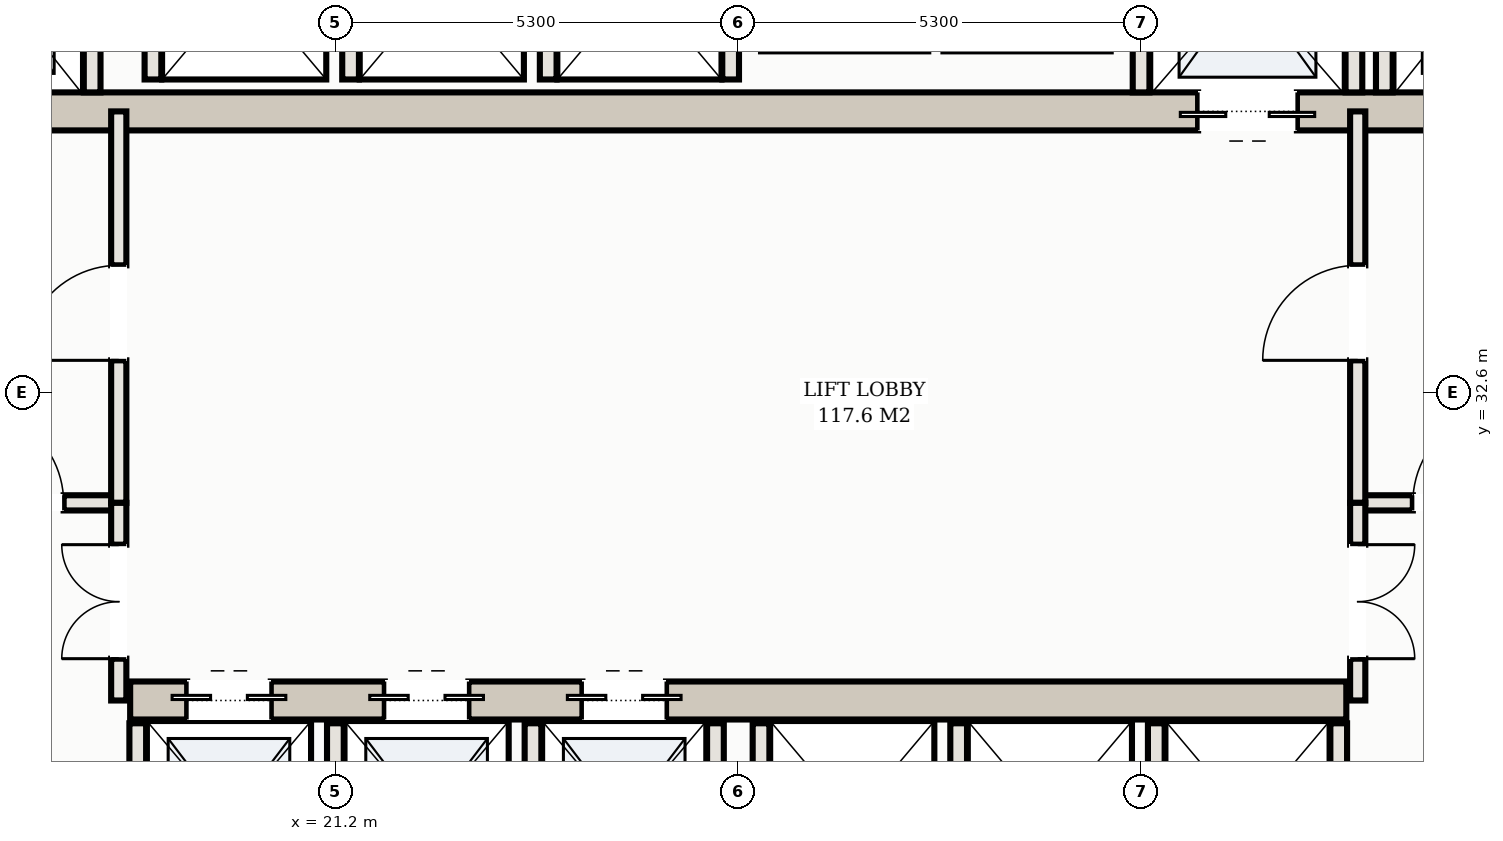
"""IFC4 building model, lengths in metres.
Left out: names, types, materials, properties, quantities, classifications, styles, units other than length and angle.
Written with IfcOpenShell. Run it as: python <this file> out.ifc"""

import sys

from ifc_helpers import new_model, si_unit, direction, frame, frame_2d, origin, place, context, subcontext, project, spatial, rectangle, extrude, element, fill, save


model = new_model("IFC4")
c1 = context("Model", 3, precision=1e-05, world=origin(), true_north=direction((0.0, 1.0)))
c2 = subcontext(c1, "Body", "Model", "MODEL_VIEW")
j1 = project(units=[si_unit("LENGTHUNIT", "METRE"), si_unit("PLANEANGLEUNIT", "RADIAN")], contexts=[c1])
p1 = place(None, origin())
s1 = spatial("IfcSite", under=j1, at=p1, CompositionType="ELEMENT")
p2 = place(p1, origin())
s2 = spatial("IfcBuilding", under=s1, at=p2, CompositionType="ELEMENT")
p3 = place(p2, frame((0.0, 0.0, 24.2)))
s3 = spatial("IfcBuildingStorey", under=s2, at=p3, CompositionType="ELEMENT", Elevation=24.2)
p4 = place(p3, frame((15.5, 36.3, 0.0), z_axis=(0.0, 0.0, 1.0), x_axis=(1.0, 0.0, 0.0)))
e1 = element("IfcWall", 1, at=p4, inside=s3, PredefinedType="SHEAR", context=c2, shape_type="SweptSolid", body=[
    extrude(rectangle(XDim=22.0, YDim=0.5, at=frame_2d((11.0, 0.0))), origin(), (0.0, 0.0, 1.0), 3.08),
])
p5 = place(p4, frame((0.65, 0.0, 0.0)))
e2 = element("IfcOpeningElement", 2, at=p5, cuts=e1, PredefinedType="OPENING", context=c2, shape_type="SweptSolid", body=[
    extrude(rectangle(XDim=1.1, YDim=2.15, at=frame_2d((0.55, 1.075))), frame((0.0, 0.26, 0.0), z_axis=(0.0, -1.0, 0.0), x_axis=(1.0, 0.0, 0.0)), (0.0, 0.0, 1.0), 0.52),
])
p6 = place(p4, frame((20.25, 0.0, 0.0)))
e3 = element("IfcOpeningElement", 3, at=p6, cuts=e1, PredefinedType="OPENING", context=c2, shape_type="SweptSolid", body=[
    extrude(rectangle(XDim=1.1, YDim=2.15, at=frame_2d((0.55, 1.075))), frame((0.0, 0.26, 0.0), z_axis=(0.0, -1.0, 0.0), x_axis=(1.0, 0.0, 0.0)), (0.0, 0.0, 1.0), 0.52),
])
p7 = place(p4, frame((17.05, 0.0, 0.0)))
e4 = element("IfcOpeningElement", 4, at=p7, cuts=e1, PredefinedType="OPENING", context=c2, shape_type="SweptSolid", body=[
    extrude(rectangle(XDim=1.3, YDim=2.2, at=frame_2d((0.65, 1.1))), frame((0.0, 0.26, 0.0), z_axis=(0.0, -1.0, 0.0), x_axis=(1.0, 0.0, 0.0)), (0.0, 0.0, 1.0), 0.52),
])
p8 = place(p3, frame((18.5, 28.55, 0.0), z_axis=(0.0, 0.0, 1.0), x_axis=(1.0, 0.0, 0.0)))
e5 = element("IfcWall", 5, at=p8, inside=s3, PredefinedType="SHEAR", context=c2, shape_type="SweptSolid", body=[
    extrude(rectangle(XDim=16.0, YDim=0.5, at=frame_2d((8.0, 0.0))), origin(), (0.0, 0.0, 1.0), 3.08),
])
p9 = place(p8, frame((0.75, 0.0, 0.0)))
e6 = element("IfcOpeningElement", 6, at=p9, cuts=e5, PredefinedType="OPENING", context=c2, shape_type="SweptSolid", body=[
    extrude(rectangle(XDim=1.1, YDim=2.15, at=frame_2d((0.55, 1.075))), frame((0.0, 0.26, 0.0), z_axis=(0.0, -1.0, 0.0), x_axis=(1.0, 0.0, 0.0)), (0.0, 0.0, 1.0), 0.52),
])
p10 = place(p8, frame((3.35, 0.0, 0.0)))
e7 = element("IfcOpeningElement", 7, at=p10, cuts=e5, PredefinedType="OPENING", context=c2, shape_type="SweptSolid", body=[
    extrude(rectangle(XDim=1.1, YDim=2.15, at=frame_2d((0.55, 1.075))), frame((0.0, 0.26, 0.0), z_axis=(0.0, -1.0, 0.0), x_axis=(1.0, 0.0, 0.0)), (0.0, 0.0, 1.0), 0.52),
])
p11 = place(p8, frame((5.95, 0.0, 0.0)))
e8 = element("IfcOpeningElement", 8, at=p11, cuts=e5, PredefinedType="OPENING", context=c2, shape_type="SweptSolid", body=[
    extrude(rectangle(XDim=1.1, YDim=2.15, at=frame_2d((0.55, 1.075))), frame((0.0, 0.26, 0.0), z_axis=(0.0, -1.0, 0.0), x_axis=(1.0, 0.0, 0.0)), (0.0, 0.0, 1.0), 0.52),
])
for number, where, z_axis, x_axis in (
    (9, (18.0, 36.55, 0.0), (0.0, 0.0, 1.0), (0.0, 1.0, 0.0)),
    (10, (35.0, 36.55, 0.0), (0.0, 0.0, 1.0), (0.0, 1.0, 0.0)),
    (11, (31.8, 36.55, 0.0), (0.0, 0.0, 1.0), (0.0, 1.0, 0.0)),
    (12, (34.6, 36.55, 0.0), (0.0, 0.0, 1.0), (0.0, 1.0, 0.0)),
):
    element("IfcWall", number, at=place(p3, frame(where, z_axis=z_axis, x_axis=x_axis)), inside=s3, PredefinedType="SOLIDWALL", context=c2, shape_type="SweptSolid", body=[
        extrude(rectangle(XDim=2.93, YDim=0.22, at=frame_2d((1.465, 0.0))), origin(), (0.0, 0.0, 1.0), 3.08),
    ])
for number, where, z_axis, x_axis in (
    (13, (18.6, 25.72, 0.0), (0.0, 0.0, 1.0), (0.0, 1.0, 0.0)),
    (14, (21.2, 25.72, 0.0), (0.0, 0.0, 1.0), (0.0, 1.0, 0.0)),
    (15, (23.8, 25.72, 0.0), (0.0, 0.0, 1.0), (0.0, 1.0, 0.0)),
    (16, (26.2, 25.72, 0.0), (0.0, 0.0, 1.0), (0.0, 1.0, 0.0)),
    (17, (26.8, 25.72, 0.0), (0.0, 0.0, 1.0), (0.0, 1.0, 0.0)),
    (18, (29.4, 25.72, 0.0), (0.0, 0.0, 1.0), (0.0, 1.0, 0.0)),
    (19, (32.0, 25.72, 0.0), (0.0, 0.0, 1.0), (0.0, 1.0, 0.0)),
    (20, (34.4, 25.72, 0.0), (0.0, 0.0, 1.0), (0.0, 1.0, 0.0)),
):
    element("IfcWall", number, at=place(p3, frame(where, z_axis=z_axis, x_axis=x_axis)), inside=s3, PredefinedType="SOLIDWALL", context=c2, shape_type="SweptSolid", body=[
        extrude(rectangle(XDim=2.53, YDim=0.22, at=frame_2d((1.265, 0.0))), origin(), (0.0, 0.0, 1.0), 3.08),
    ])
for number, where, z_axis, x_axis in (
    (21, (18.8, 36.72, 0.0), (0.0, 0.0, 1.0), (0.0, 1.0, 0.0)),
    (22, (21.4, 36.72, 0.0), (0.0, 0.0, 1.0), (0.0, 1.0, 0.0)),
    (23, (24.0, 36.72, 0.0), (0.0, 0.0, 1.0), (0.0, 1.0, 0.0)),
    (24, (26.4, 36.72, 0.0), (0.0, 0.0, 1.0), (0.0, 1.0, 0.0)),
):
    element("IfcWall", number, at=place(p3, frame(where, z_axis=z_axis, x_axis=x_axis)), inside=s3, PredefinedType="SOLIDWALL", context=c2, shape_type="SweptSolid", body=[
        extrude(rectangle(XDim=2.56, YDim=0.22, at=frame_2d((1.28, 0.0))), origin(), (0.0, 0.0, 1.0), 3.08),
    ])
p12 = place(p3, frame((15.1, 31.15, 0.0), z_axis=(0.0, 0.0, 1.0), x_axis=(1.0, 0.0, 0.0)))
e25 = element("IfcWall", 25, at=p12, inside=s3, PredefinedType="PARTITIONING", context=c2, shape_type="SweptSolid", body=[
    extrude(rectangle(XDim=3.25, YDim=0.2, at=frame_2d((1.625, 0.0))), origin(), (0.0, 0.0, 1.0), 2.57),
])
p13 = place(p12, frame((1.275, 0.0, 0.0)))
e26 = element("IfcOpeningElement", 26, at=p13, cuts=e25, PredefinedType="OPENING", context=c2, shape_type="SweptSolid", body=[
    extrude(rectangle(XDim=1.25, YDim=2.2, at=frame_2d((0.625, 1.1))), frame((0.0, 0.11, 0.0), z_axis=(0.0, -1.0, 0.0), x_axis=(1.0, 0.0, 0.0)), (0.0, 0.0, 1.0), 0.22),
])
p14 = place(p3, frame((18.35, 31.15, 0.0), z_axis=(0.0, 0.0, 1.0), x_axis=(0.0, 1.0, 0.0)))
e27 = element("IfcWall", 27, at=p14, inside=s3, PredefinedType="PARTITIONING", context=c2, shape_type="SweptSolid", body=[
    extrude(rectangle(XDim=5.15, YDim=0.2, at=frame_2d((2.575, 0.0))), origin(), (0.0, 0.0, 1.0), 2.57),
])
p15 = place(p14, frame((1.875, 0.0, 0.0)))
e28 = element("IfcOpeningElement", 28, at=p15, cuts=e27, PredefinedType="OPENING", context=c2, shape_type="SweptSolid", body=[
    extrude(rectangle(XDim=1.25, YDim=2.2, at=frame_2d((0.625, 1.1))), frame((0.0, 0.11, 0.0), z_axis=(0.0, -1.0, 0.0), x_axis=(1.0, 0.0, 0.0)), (0.0, 0.0, 1.0), 0.22),
])
p16 = place(p3, frame((34.65, 31.15, 0.0), z_axis=(0.0, 0.0, 1.0), x_axis=(1.0, 0.0, 0.0)))
e29 = element("IfcWall", 29, at=p16, inside=s3, PredefinedType="PARTITIONING", context=c2, shape_type="SweptSolid", body=[
    extrude(rectangle(XDim=3.25, YDim=0.2, at=frame_2d((1.625, 0.0))), origin(), (0.0, 0.0, 1.0), 2.57),
])
p17 = place(p16, frame((0.725, 0.0, 0.0)))
e30 = element("IfcOpeningElement", 30, at=p17, cuts=e29, PredefinedType="OPENING", context=c2, shape_type="SweptSolid", body=[
    extrude(rectangle(XDim=1.25, YDim=2.2, at=frame_2d((0.625, 1.1))), frame((0.0, 0.11, 0.0), z_axis=(0.0, -1.0, 0.0), x_axis=(1.0, 0.0, 0.0)), (0.0, 0.0, 1.0), 0.22),
])
p18 = place(p3, frame((34.65, 31.15, 0.0), z_axis=(0.0, 0.0, 1.0), x_axis=(0.0, 1.0, 0.0)))
e31 = element("IfcWall", 31, at=p18, inside=s3, PredefinedType="PARTITIONING", context=c2, shape_type="SweptSolid", body=[
    extrude(rectangle(XDim=5.15, YDim=0.2, at=frame_2d((2.575, 0.0))), origin(), (0.0, 0.0, 1.0), 2.57),
])
p19 = place(p18, frame((1.875, 0.0, 0.0)))
e32 = element("IfcOpeningElement", 32, at=p19, cuts=e31, PredefinedType="OPENING", context=c2, shape_type="SweptSolid", body=[
    extrude(rectangle(XDim=1.25, YDim=2.2, at=frame_2d((0.625, 1.1))), frame((0.0, 0.11, 0.0), z_axis=(0.0, -1.0, 0.0), x_axis=(1.0, 0.0, 0.0)), (0.0, 0.0, 1.0), 0.22),
])
p20 = place(p3, frame((18.35, 28.55, 0.0), z_axis=(0.0, 0.0, 1.0), x_axis=(0.0, 1.0, 0.0)))
e33 = element("IfcWall", 33, at=p20, inside=s3, PredefinedType="PARTITIONING", context=c2, shape_type="SweptSolid", body=[
    extrude(rectangle(XDim=2.6, YDim=0.2, at=frame_2d((1.3, 0.0))), origin(), (0.0, 0.0, 1.0), 2.57),
])
p21 = place(p20, frame((0.55, 0.0, 0.0)))
e34 = element("IfcOpeningElement", 34, at=p21, cuts=e33, PredefinedType="OPENING", context=c2, shape_type="SweptSolid", body=[
    extrude(rectangle(XDim=1.5, YDim=2.25, at=frame_2d((0.75, 1.125))), frame((0.0, 0.11, 0.0), z_axis=(0.0, -1.0, 0.0), x_axis=(1.0, 0.0, 0.0)), (0.0, 0.0, 1.0), 0.22),
])
p22 = place(p3, frame((34.65, 28.55, 0.0), z_axis=(0.0, 0.0, 1.0), x_axis=(0.0, 1.0, 0.0)))
e35 = element("IfcWall", 35, at=p22, inside=s3, PredefinedType="PARTITIONING", context=c2, shape_type="SweptSolid", body=[
    extrude(rectangle(XDim=2.6, YDim=0.2, at=frame_2d((1.3, 0.0))), origin(), (0.0, 0.0, 1.0), 2.57),
])
p23 = place(p22, frame((0.55, 0.0, 0.0)))
e36 = element("IfcOpeningElement", 36, at=p23, cuts=e35, PredefinedType="OPENING", context=c2, shape_type="SweptSolid", body=[
    extrude(rectangle(XDim=1.5, YDim=2.25, at=frame_2d((0.75, 1.125))), frame((0.0, 0.11, 0.0), z_axis=(0.0, -1.0, 0.0), x_axis=(1.0, 0.0, 0.0)), (0.0, 0.0, 1.0), 0.22),
])
p24 = place(p7, frame((1.3, 0.0, 0.0), z_axis=(0.0, 0.0, 1.0), x_axis=(-1.0, 0.0, 0.0)))
e37 = element("IfcDoor", 37, at=p24, inside=s3, OperationType="DOUBLE_DOOR_SLIDING", PredefinedType="DOOR", context=c2, shape_type="SweptSolid", body=[
    extrude(rectangle(XDim=1.3, YDim=2.2, at=frame_2d((0.65, 1.1))), frame((0.0, 0.025, 0.0), z_axis=(0.0, -1.0, 0.0), x_axis=(1.0, 0.0, 0.0)), (0.0, 0.0, 1.0), 0.05),
])
fill(e4, e37)
p25 = place(p9, origin())
e38 = element("IfcDoor", 38, at=p25, inside=s3, OperationType="DOUBLE_DOOR_SLIDING", PredefinedType="DOOR", context=c2, shape_type="SweptSolid", body=[
    extrude(rectangle(XDim=1.1, YDim=2.15, at=frame_2d((0.55, 1.075))), frame((0.0, 0.025, 0.0), z_axis=(0.0, -1.0, 0.0), x_axis=(1.0, 0.0, 0.0)), (0.0, 0.0, 1.0), 0.05),
])
fill(e6, e38)
p26 = place(p10, origin())
e39 = element("IfcDoor", 39, at=p26, inside=s3, OperationType="DOUBLE_DOOR_SLIDING", PredefinedType="DOOR", context=c2, shape_type="SweptSolid", body=[
    extrude(rectangle(XDim=1.1, YDim=2.15, at=frame_2d((0.55, 1.075))), frame((0.0, 0.025, 0.0), z_axis=(0.0, -1.0, 0.0), x_axis=(1.0, 0.0, 0.0)), (0.0, 0.0, 1.0), 0.05),
])
fill(e7, e39)
p27 = place(p11, origin())
e40 = element("IfcDoor", 40, at=p27, inside=s3, OperationType="DOUBLE_DOOR_SLIDING", PredefinedType="DOOR", context=c2, shape_type="SweptSolid", body=[
    extrude(rectangle(XDim=1.1, YDim=2.15, at=frame_2d((0.55, 1.075))), frame((0.0, 0.025, 0.0), z_axis=(0.0, -1.0, 0.0), x_axis=(1.0, 0.0, 0.0)), (0.0, 0.0, 1.0), 0.05),
])
fill(e8, e40)
p28 = place(p13, origin())
e41 = element("IfcDoor", 41, at=p28, inside=s3, OperationType="SINGLE_SWING_LEFT", PredefinedType="DOOR", context=c2, shape_type="SweptSolid", body=[
    extrude(rectangle(XDim=1.25, YDim=2.2, at=frame_2d((0.625, 1.1))), frame((0.0, 0.025, 0.0), z_axis=(0.0, -1.0, 0.0), x_axis=(1.0, 0.0, 0.0)), (0.0, 0.0, 1.0), 0.05),
])
fill(e26, e41)
p29 = place(p15, origin())
e42 = element("IfcDoor", 42, at=p29, inside=s3, OperationType="SINGLE_SWING_LEFT", PredefinedType="DOOR", context=c2, shape_type="SweptSolid", body=[
    extrude(rectangle(XDim=1.25, YDim=2.2, at=frame_2d((0.625, 1.1))), frame((0.0, 0.025, 0.0), z_axis=(0.0, -1.0, 0.0), x_axis=(1.0, 0.0, 0.0)), (0.0, 0.0, 1.0), 0.05),
])
fill(e28, e42)
p30 = place(p17, origin())
e43 = element("IfcDoor", 43, at=p30, inside=s3, OperationType="SINGLE_SWING_RIGHT", PredefinedType="DOOR", context=c2, shape_type="SweptSolid", body=[
    extrude(rectangle(XDim=1.25, YDim=2.2, at=frame_2d((0.625, 1.1))), frame((0.0, 0.025, 0.0), z_axis=(0.0, -1.0, 0.0), x_axis=(1.0, 0.0, 0.0)), (0.0, 0.0, 1.0), 0.05),
])
fill(e30, e43)
p31 = place(p19, origin())
e44 = element("IfcDoor", 44, at=p31, inside=s3, OperationType="SINGLE_SWING_LEFT", PredefinedType="DOOR", context=c2, shape_type="SweptSolid", body=[
    extrude(rectangle(XDim=1.25, YDim=2.2, at=frame_2d((0.625, 1.1))), frame((0.0, 0.025, 0.0), z_axis=(0.0, -1.0, 0.0), x_axis=(1.0, 0.0, 0.0)), (0.0, 0.0, 1.0), 0.05),
])
fill(e32, e44)
p32 = place(p21, origin())
e45 = element("IfcDoor", 45, at=p32, inside=s3, OperationType="DOUBLE_DOOR_SINGLE_SWING", PredefinedType="DOOR", context=c2, shape_type="SweptSolid", body=[
    extrude(rectangle(XDim=1.5, YDim=2.25, at=frame_2d((0.75, 1.125))), frame((0.0, 0.025, 0.0), z_axis=(0.0, -1.0, 0.0), x_axis=(1.0, 0.0, 0.0)), (0.0, 0.0, 1.0), 0.05),
])
fill(e34, e45)
p33 = place(p23, frame((1.5, 0.0, 0.0), z_axis=(0.0, 0.0, 1.0), x_axis=(-1.0, 0.0, 0.0)))
e46 = element("IfcDoor", 46, at=p33, inside=s3, OperationType="DOUBLE_DOOR_SINGLE_SWING", PredefinedType="DOOR", context=c2, shape_type="SweptSolid", body=[
    extrude(rectangle(XDim=1.5, YDim=2.25, at=frame_2d((0.75, 1.125))), frame((0.0, 0.025, 0.0), z_axis=(0.0, -1.0, 0.0), x_axis=(1.0, 0.0, 0.0)), (0.0, 0.0, 1.0), 0.05),
])
fill(e36, e46)
save(model, sys.argv[1])
